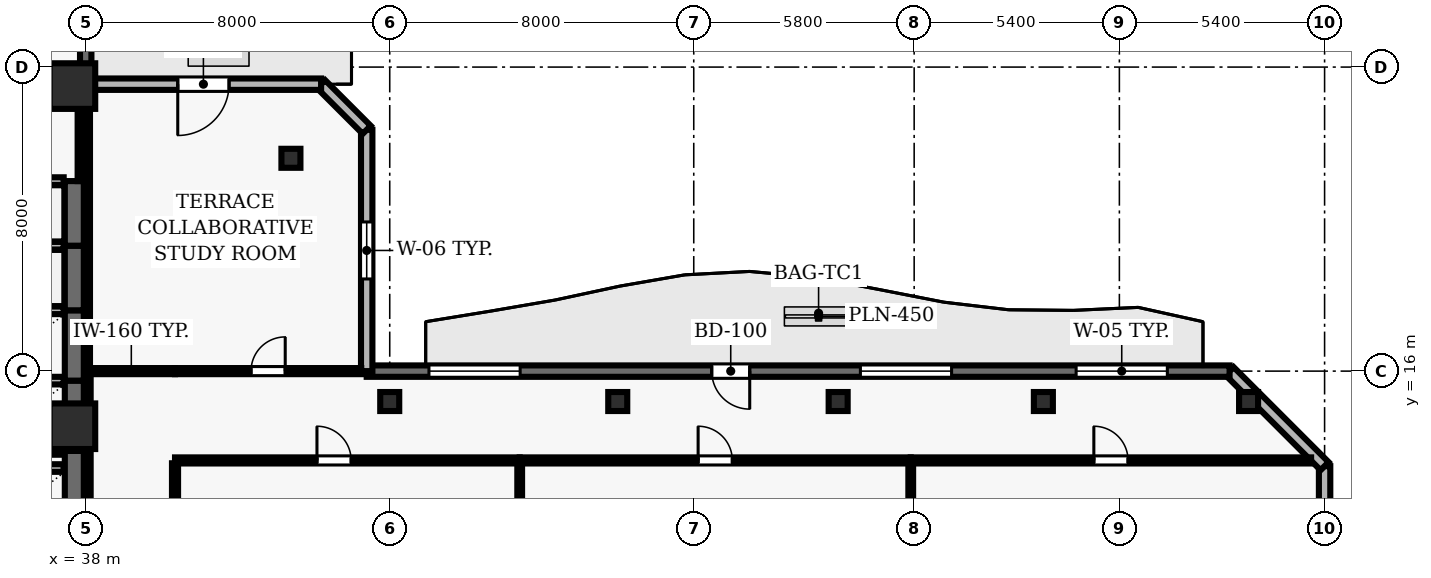
"""IFC4 building model, lengths in metres.
Left out: names, types, materials, properties, quantities, classifications, styles, units other than length and angle.
Written with IfcOpenShell. Run it as: python <this file> out.ifc"""

import sys

from ifc_helpers import new_model, si_unit, direction, frame, frame_2d, origin, origin_2d, place, context, subcontext, project, spatial, rectangle, hollow_rectangle, extrude, element, fill, save


model = new_model("IFC4")
c1 = context("Model", 3, precision=1e-05, world=origin(), true_north=direction((0.0, 1.0)))
c2 = subcontext(c1, "Body", "Model", "MODEL_VIEW")
j1 = project(units=[si_unit("LENGTHUNIT", "METRE"), si_unit("PLANEANGLEUNIT", "RADIAN")], contexts=[c1])
p1 = place(None, origin())
s1 = spatial("IfcSite", under=j1, at=p1, CompositionType="ELEMENT")
p2 = place(p1, origin())
s2 = spatial("IfcBuilding", under=s1, at=p2, CompositionType="ELEMENT")
p3 = place(p2, frame((0.0, 0.0, 150.2)))
s3 = spatial("IfcBuildingStorey", under=s2, at=p3, CompositionType="ELEMENT", Elevation=150.2)
for number, where, z_axis, x_axis in (
    (1, (37.65, 14.55, 0.0), (0.0, 0.0, 1.0), (1.0, 0.0, 0.0)),
    (2, (37.65, 23.5, 0.0), (0.0, 0.0, 1.0), (1.0, 0.0, 0.0)),
):
    element("IfcColumn", number, at=place(p3, frame(where, z_axis=z_axis, x_axis=x_axis)), inside=s3, PredefinedType="COLUMN", context=c2, shape_type="SweptSolid", body=[
        extrude(rectangle(XDim=1.2, YDim=1.2, at=origin_2d()), origin(), (0.0, 0.0, 1.0), 3.9),
    ])
for number, where, z_axis, x_axis in (
    (3, (46.0, 15.2, 0.0), (0.0, 0.0, 1.0), (1.0, 0.0, 0.0)),
    (4, (52.0, 15.2, 0.0), (0.0, 0.0, 1.0), (1.0, 0.0, 0.0)),
    (5, (57.8, 15.2, 0.0), (0.0, 0.0, 1.0), (1.0, 0.0, 0.0)),
    (6, (63.2, 15.2, 0.0), (0.0, 0.0, 1.0), (1.0, 0.0, 0.0)),
    (7, (68.6, 15.2, 0.0), (0.0, 0.0, 1.0), (1.0, 0.0, 0.0)),
    (8, (43.4, 21.6, 0.0), (0.0, 0.0, 1.0), (1.0, 0.0, 0.0)),
):
    element("IfcColumn", number, at=place(p3, frame(where, z_axis=z_axis, x_axis=x_axis)), inside=s3, PredefinedType="COLUMN", context=c2, shape_type="SweptSolid", body=[
        extrude(hollow_rectangle(XDim=0.5, YDim=0.5, WallThickness=0.025, at=origin_2d()), origin(), (0.0, 0.0, 1.0), 3.9),
    ])
p4 = place(p3, frame((70.6, 2.5, 0.0), z_axis=(0.0, 0.0, 1.0), x_axis=(0.0, 1.0, 0.0)))
e9 = element("IfcWall", 9, at=p4, inside=s3, PredefinedType="SOLIDWALL", context=c2, shape_type="SweptSolid", body=[
    extrude(rectangle(XDim=11.0, YDim=0.3, at=frame_2d((5.5, 0.0))), origin(), (0.0, 0.0, 1.0), 3.69),
])
p5 = place(p4, frame((1.85, 0.0, 0.9)))
e10 = element("IfcOpeningElement", 10, at=p5, cuts=e9, PredefinedType="OPENING", context=c2, shape_type="SweptSolid", body=[
    extrude(rectangle(XDim=1.8, YDim=1.6, at=frame_2d((0.9, 0.8))), frame((0.0, 0.16, 0.0), z_axis=(0.0, -1.0, 0.0), x_axis=(1.0, 0.0, 0.0)), (0.0, 0.0, 1.0), 0.32),
])
p6 = place(p4, frame((7.35, 0.0, 0.9)))
e11 = element("IfcOpeningElement", 11, at=p6, cuts=e9, PredefinedType="OPENING", context=c2, shape_type="SweptSolid", body=[
    extrude(rectangle(XDim=1.8, YDim=1.6, at=frame_2d((0.9, 0.8))), frame((0.0, 0.16, 0.0), z_axis=(0.0, -1.0, 0.0), x_axis=(1.0, 0.0, 0.0)), (0.0, 0.0, 1.0), 0.32),
])
p7 = place(p3, frame((70.6, 13.5, 0.0), z_axis=(0.0, 0.0, 1.0), x_axis=(-0.707106781187, 0.707106781187, 0.0)))
e12 = element("IfcWall", 12, at=p7, inside=s3, PredefinedType="SOLIDWALL", context=c2, shape_type="SweptSolid", body=[
    extrude(rectangle(XDim=3.536, YDim=0.3, at=frame_2d((1.768, 0.0))), origin(), (0.0, 0.0, 1.0), 3.69),
])
p8 = place(p3, frame((68.1, 16.0, 0.0), z_axis=(0.0, 0.0, 1.0), x_axis=(-1.0, 0.0, 0.0)))
e13 = element("IfcWall", 13, at=p8, inside=s3, PredefinedType="SOLIDWALL", context=c2, shape_type="SweptSolid", body=[
    extrude(rectangle(XDim=22.706, YDim=0.3, at=frame_2d((11.353, 0.0))), origin(), (0.0, 0.0, 1.0), 3.69),
])
p9 = place(p8, frame((12.627, 0.0, 0.0)))
e14 = element("IfcOpeningElement", 14, at=p9, cuts=e13, PredefinedType="OPENING", context=c2, shape_type="SweptSolid", body=[
    extrude(rectangle(XDim=1.0, YDim=2.2, at=frame_2d((0.5, 1.1))), frame((0.0, 0.16, 0.0), z_axis=(0.0, -1.0, 0.0), x_axis=(1.0, 0.0, 0.0)), (0.0, 0.0, 1.0), 0.32),
])
p10 = place(p8, frame((1.638, 0.0, 0.9)))
e15 = element("IfcOpeningElement", 15, at=p10, cuts=e13, PredefinedType="OPENING", context=c2, shape_type="SweptSolid", body=[
    extrude(rectangle(XDim=2.4, YDim=1.6, at=frame_2d((1.2, 0.8))), frame((0.0, 0.16, 0.0), z_axis=(0.0, -1.0, 0.0), x_axis=(1.0, 0.0, 0.0)), (0.0, 0.0, 1.0), 0.32),
])
p11 = place(p8, frame((7.315, 0.0, 0.9)))
e16 = element("IfcOpeningElement", 16, at=p11, cuts=e13, PredefinedType="OPENING", context=c2, shape_type="SweptSolid", body=[
    extrude(rectangle(XDim=2.4, YDim=1.6, at=frame_2d((1.2, 0.8))), frame((0.0, 0.16, 0.0), z_axis=(0.0, -1.0, 0.0), x_axis=(1.0, 0.0, 0.0)), (0.0, 0.0, 1.0), 0.32),
])
p12 = place(p8, frame((18.668, 0.0, 0.9)))
e17 = element("IfcOpeningElement", 17, at=p12, cuts=e13, PredefinedType="OPENING", context=c2, shape_type="SweptSolid", body=[
    extrude(rectangle(XDim=2.4, YDim=1.6, at=frame_2d((1.2, 0.8))), frame((0.0, 0.16, 0.0), z_axis=(0.0, -1.0, 0.0), x_axis=(1.0, 0.0, 0.0)), (0.0, 0.0, 1.0), 0.32),
])
p13 = place(p3, frame((45.394, 16.0, 0.0), z_axis=(0.0, 0.0, 1.0), x_axis=(0.0, 1.0, 0.0)))
e18 = element("IfcWall", 18, at=p13, inside=s3, PredefinedType="SOLIDWALL", context=c2, shape_type="SweptSolid", body=[
    extrude(rectangle(XDim=6.35, YDim=0.3, at=frame_2d((3.175, 0.0))), origin(), (0.0, 0.0, 1.0), 3.69),
])
p14 = place(p13, frame((2.425, 0.0, 0.9)))
e19 = element("IfcOpeningElement", 19, at=p14, cuts=e18, PredefinedType="OPENING", context=c2, shape_type="SweptSolid", body=[
    extrude(rectangle(XDim=1.5, YDim=1.8, at=frame_2d((0.75, 0.9))), frame((0.0, 0.16, 0.0), z_axis=(0.0, -1.0, 0.0), x_axis=(1.0, 0.0, 0.0)), (0.0, 0.0, 1.0), 0.32),
])
p15 = place(p3, frame((45.394, 22.35, 0.0), z_axis=(0.0, 0.0, 1.0), x_axis=(-0.707106781187, 0.707106781187, 0.0)))
e20 = element("IfcWall", 20, at=p15, inside=s3, PredefinedType="SOLIDWALL", context=c2, shape_type="SweptSolid", body=[
    extrude(rectangle(XDim=1.697, YDim=0.3, at=frame_2d((0.849, 0.0))), origin(), (0.0, 0.0, 1.0), 3.69),
])
p16 = place(p3, frame((44.194, 23.55, 0.0), z_axis=(0.0, 0.0, 1.0), x_axis=(-1.0, 0.0, 0.0)))
e21 = element("IfcWall", 21, at=p16, inside=s3, PredefinedType="SOLIDWALL", context=c2, shape_type="SweptSolid", body=[
    extrude(rectangle(XDim=6.194, YDim=0.3, at=frame_2d((3.097, 0.0))), origin(), (0.0, 0.0, 1.0), 3.69),
])
p17 = place(p16, frame((2.422, 0.0, 0.0)))
e22 = element("IfcOpeningElement", 22, at=p17, cuts=e21, PredefinedType="OPENING", context=c2, shape_type="SweptSolid", body=[
    extrude(rectangle(XDim=1.35, YDim=2.2, at=frame_2d((0.675, 1.1))), frame((0.0, 0.16, 0.0), z_axis=(0.0, -1.0, 0.0), x_axis=(1.0, 0.0, 0.0)), (0.0, 0.0, 1.0), 0.32),
])
p18 = place(p3, frame((38.0, 23.55, 0.0), z_axis=(0.0, 0.0, 1.0), x_axis=(0.0, 1.0, 0.0)))
e23 = element("IfcWall", 23, at=p18, inside=s3, PredefinedType="SOLIDWALL", context=c2, shape_type="SweptSolid", body=[
    extrude(rectangle(XDim=22.55, YDim=0.3, at=frame_2d((11.275, 0.0))), origin(), (0.0, 0.0, 1.0), 3.69),
])
p19 = place(p18, frame((13.8, 0.0, 0.0)))
e24 = element("IfcOpeningElement", 24, at=p19, cuts=e23, PredefinedType="OPENING", context=c2, shape_type="SweptSolid", body=[
    extrude(rectangle(XDim=1.0, YDim=2.2, at=frame_2d((0.5, 1.1))), frame((0.0, 0.16, 0.0), z_axis=(0.0, -1.0, 0.0), x_axis=(1.0, 0.0, 0.0)), (0.0, 0.0, 1.0), 0.32),
])
p20 = place(p18, frame((7.056, 0.0, 0.9)))
e25 = element("IfcOpeningElement", 25, at=p20, cuts=e23, PredefinedType="OPENING", context=c2, shape_type="SweptSolid", body=[
    extrude(rectangle(XDim=2.8, YDim=1.8, at=frame_2d((1.4, 0.9))), frame((0.0, 0.16, 0.0), z_axis=(0.0, -1.0, 0.0), x_axis=(1.0, 0.0, 0.0)), (0.0, 0.0, 1.0), 0.32),
])
p21 = place(p18, frame((18.331, 0.0, 0.9)))
e26 = element("IfcOpeningElement", 26, at=p21, cuts=e23, PredefinedType="OPENING", context=c2, shape_type="SweptSolid", body=[
    extrude(rectangle(XDim=2.8, YDim=1.8, at=frame_2d((1.4, 0.9))), frame((0.0, 0.16, 0.0), z_axis=(0.0, -1.0, 0.0), x_axis=(1.0, 0.0, 0.0)), (0.0, 0.0, 1.0), 0.32),
])
p22 = place(p3, frame((37.7, 11.55, 0.0), z_axis=(0.0, 0.0, 1.0), x_axis=(0.0, 1.0, 0.0)))
e27 = element("IfcWall", 27, at=p22, inside=s3, PredefinedType="SHEAR", context=c2, shape_type="SweptSolid", body=[
    extrude(rectangle(XDim=2.35, YDim=0.5, at=frame_2d((1.175, 0.0))), origin(), (0.0, 0.0, 1.0), 3.69),
])
p23 = place(p3, frame((37.42, 13.45, 0.0), z_axis=(0.0, 0.0, 1.0), x_axis=(-1.0, 0.0, 0.0)))
e28 = element("IfcWall", 28, at=p23, inside=s3, PredefinedType="SOLIDWALL", context=c2, shape_type="SweptSolid", body=[
    extrude(rectangle(XDim=2.14, YDim=0.2, at=frame_2d((1.07, 0.0))), origin(), (0.0, 0.0, 1.0), 3.69),
])
p24 = place(p3, frame((37.7, 13.9, 0.0), z_axis=(0.0, 0.0, 1.0), x_axis=(0.0, 1.0, 0.0)))
e29 = element("IfcWall", 29, at=p24, inside=s3, PredefinedType="SHEAR", context=c2, shape_type="SweptSolid", body=[
    extrude(rectangle(XDim=1.85, YDim=0.5, at=frame_2d((0.925, 0.0))), origin(), (0.0, 0.0, 1.0), 3.69),
])
for number, where, z_axis, x_axis in (
    (30, (35.28, 13.9, 0.0), (0.0, 0.0, 1.0), (1.0, 0.0, 0.0)),
    (31, (37.42, 15.75, 0.0), (0.0, 0.0, 1.0), (-1.0, 0.0, 0.0)),
):
    element("IfcWall", number, at=place(p3, frame(where, z_axis=z_axis, x_axis=x_axis)), inside=s3, PredefinedType="SOLIDWALL", context=c2, shape_type="SweptSolid", body=[
        extrude(rectangle(XDim=2.14, YDim=0.2, at=frame_2d((1.07, 0.0))), origin(), (0.0, 0.0, 1.0), 3.69),
    ])
p25 = place(p3, frame((37.7, 15.75, 0.0), z_axis=(0.0, 0.0, 1.0), x_axis=(0.0, 1.0, 0.0)))
e32 = element("IfcWall", 32, at=p25, inside=s3, PredefinedType="SHEAR", context=c2, shape_type="SweptSolid", body=[
    extrude(rectangle(XDim=1.85, YDim=0.5, at=frame_2d((0.925, 0.0))), origin(), (0.0, 0.0, 1.0), 3.69),
])
p26 = place(p3, frame((37.42, 17.6, 0.0), z_axis=(0.0, 0.0, 1.0), x_axis=(-1.0, 0.0, 0.0)))
e33 = element("IfcWall", 33, at=p26, inside=s3, PredefinedType="SOLIDWALL", context=c2, shape_type="SweptSolid", body=[
    extrude(rectangle(XDim=2.14, YDim=0.2, at=frame_2d((1.07, 0.0))), origin(), (0.0, 0.0, 1.0), 3.69),
])
p27 = place(p3, frame((37.7, 17.6, 0.0), z_axis=(0.0, 0.0, 1.0), x_axis=(0.0, 1.0, 0.0)))
e34 = element("IfcWall", 34, at=p27, inside=s3, PredefinedType="SHEAR", context=c2, shape_type="SweptSolid", body=[
    extrude(rectangle(XDim=1.7, YDim=0.5, at=frame_2d((0.85, 0.0))), origin(), (0.0, 0.0, 1.0), 3.69),
])
p28 = place(p3, frame((37.42, 19.3, 0.0), z_axis=(0.0, 0.0, 1.0), x_axis=(-1.0, 0.0, 0.0)))
e35 = element("IfcWall", 35, at=p28, inside=s3, PredefinedType="SOLIDWALL", context=c2, shape_type="SweptSolid", body=[
    extrude(rectangle(XDim=2.14, YDim=0.2, at=frame_2d((1.07, 0.0))), origin(), (0.0, 0.0, 1.0), 3.69),
])
p29 = place(p3, frame((37.7, 19.3, 0.0), z_axis=(0.0, 0.0, 1.0), x_axis=(0.0, 1.0, 0.0)))
e36 = element("IfcWall", 36, at=p29, inside=s3, PredefinedType="SHEAR", context=c2, shape_type="SweptSolid", body=[
    extrude(rectangle(XDim=1.7, YDim=0.5, at=frame_2d((0.85, 0.0))), origin(), (0.0, 0.0, 1.0), 3.69),
])
p30 = place(p3, frame((37.42, 21.0, 0.0), z_axis=(0.0, 0.0, 1.0), x_axis=(-1.0, 0.0, 0.0)))
e37 = element("IfcWall", 37, at=p30, inside=s3, PredefinedType="SOLIDWALL", context=c2, shape_type="SweptSolid", body=[
    extrude(rectangle(XDim=2.14, YDim=0.2, at=frame_2d((1.07, 0.0))), origin(), (0.0, 0.0, 1.0), 3.69),
])
p31 = place(p3, frame((37.85, 23.85, 0.0), z_axis=(0.0, 0.0, 1.0), x_axis=(-1.0, 0.0, 0.0)))
e38 = element("IfcWall", 38, at=p31, inside=s3, PredefinedType="PARTITIONING", context=c2, shape_type="SweptSolid", body=[
    extrude(rectangle(XDim=4.0, YDim=0.16, at=frame_2d((2.0, 0.0))), origin(), (0.0, 0.0, 1.0), 3.074),
])
p32 = place(p31, frame((2.25, 0.0, 0.0)))
e39 = element("IfcOpeningElement", 39, at=p32, cuts=e38, PredefinedType="OPENING", context=c2, shape_type="SweptSolid", body=[
    extrude(rectangle(XDim=0.9, YDim=2.1, at=frame_2d((0.45, 1.05))), frame((0.0, 0.09, 0.0), z_axis=(0.0, -1.0, 0.0), x_axis=(1.0, 0.0, 0.0)), (0.0, 0.0, 1.0), 0.18),
])
p33 = place(p3, frame((40.35, 13.65, 0.0), z_axis=(0.0, 0.0, 1.0), x_axis=(1.0, 0.0, 0.0)))
e40 = element("IfcWall", 40, at=p33, inside=s3, PredefinedType="PARTITIONING", context=c2, shape_type="SweptSolid", body=[
    extrude(rectangle(XDim=9.07, YDim=0.16, at=frame_2d((4.535, 0.0))), origin(), (0.0, 0.0, 1.0), 3.69),
])
p34 = place(p33, frame((3.735, 0.0, 0.0)))
e41 = element("IfcOpeningElement", 41, at=p34, cuts=e40, PredefinedType="OPENING", context=c2, shape_type="SweptSolid", body=[
    extrude(rectangle(XDim=0.9, YDim=2.1, at=frame_2d((0.45, 1.05))), frame((0.0, 0.09, 0.0), z_axis=(0.0, -1.0, 0.0), x_axis=(1.0, 0.0, 0.0)), (0.0, 0.0, 1.0), 0.18),
])
p35 = place(p3, frame((40.35, 16.0, 0.0), z_axis=(0.0, 0.0, 1.0), x_axis=(-1.0, 0.0, 0.0)))
e42 = element("IfcWall", 42, at=p35, inside=s3, PredefinedType="PARTITIONING", context=c2, shape_type="SweptSolid", body=[
    extrude(rectangle(XDim=2.3, YDim=0.16, at=frame_2d((1.15, 0.0))), origin(), (0.0, 0.0, 1.0), 3.69),
])
p36 = place(p3, frame((40.35, 16.0, 0.0), z_axis=(0.0, 0.0, 1.0), x_axis=(1.0, 0.0, 0.0)))
e43 = element("IfcWall", 43, at=p36, inside=s3, PredefinedType="PARTITIONING", context=c2, shape_type="SweptSolid", body=[
    extrude(rectangle(XDim=4.899, YDim=0.16, at=frame_2d((2.449, 0.0))), origin(), (0.0, 0.0, 1.0), 3.69),
])
p37 = place(p36, frame((2.0, 0.0, 0.0)))
e44 = element("IfcOpeningElement", 44, at=p37, cuts=e43, PredefinedType="OPENING", context=c2, shape_type="SweptSolid", body=[
    extrude(rectangle(XDim=0.9, YDim=2.1, at=frame_2d((0.45, 1.05))), frame((0.0, 0.09, 0.0), z_axis=(0.0, -1.0, 0.0), x_axis=(1.0, 0.0, 0.0)), (0.0, 0.0, 1.0), 0.18),
])
p38 = place(p3, frame((49.42, 13.65, 0.0), z_axis=(0.0, 0.0, 1.0), x_axis=(1.0, 0.0, 0.0)))
e45 = element("IfcWall", 45, at=p38, inside=s3, PredefinedType="PARTITIONING", context=c2, shape_type="SweptSolid", body=[
    extrude(rectangle(XDim=10.29, YDim=0.16, at=frame_2d((5.145, 0.0))), origin(), (0.0, 0.0, 1.0), 3.69),
])
p39 = place(p38, frame((4.695, 0.0, 0.0)))
e46 = element("IfcOpeningElement", 46, at=p39, cuts=e45, PredefinedType="OPENING", context=c2, shape_type="SweptSolid", body=[
    extrude(rectangle(XDim=0.9, YDim=2.1, at=frame_2d((0.45, 1.05))), frame((0.0, 0.09, 0.0), z_axis=(0.0, -1.0, 0.0), x_axis=(1.0, 0.0, 0.0)), (0.0, 0.0, 1.0), 0.18),
])
p40 = place(p3, frame((59.71, 13.65, 0.0), z_axis=(0.0, 0.0, 1.0), x_axis=(1.0, 0.0, 0.0)))
e47 = element("IfcWall", 47, at=p40, inside=s3, PredefinedType="PARTITIONING", context=c2, shape_type="SweptSolid", body=[
    extrude(rectangle(XDim=10.535, YDim=0.16, at=frame_2d((5.268, 0.0))), origin(), (0.0, 0.0, 1.0), 3.69),
])
p41 = place(p40, frame((4.818, 0.0, 0.0)))
e48 = element("IfcOpeningElement", 48, at=p41, cuts=e47, PredefinedType="OPENING", context=c2, shape_type="SweptSolid", body=[
    extrude(rectangle(XDim=0.9, YDim=2.1, at=frame_2d((0.45, 1.05))), frame((0.0, 0.09, 0.0), z_axis=(0.0, -1.0, 0.0), x_axis=(1.0, 0.0, 0.0)), (0.0, 0.0, 1.0), 0.18),
])
p42 = place(p3, frame((37.85, 21.0, 0.0), z_axis=(0.0, 0.0, 1.0), x_axis=(0.0, 1.0, 0.0)))
e49 = element("IfcWall", 49, at=p42, inside=s3, PredefinedType="PARTITIONING", context=c2, shape_type="SweptSolid", body=[
    extrude(rectangle(XDim=2.55, YDim=0.125, at=frame_2d((1.275, 0.0))), origin(), (0.0, 0.0, 1.0), 3.074),
])
p43 = place(p3, frame((38.05, 15.925, 0.0), z_axis=(0.0, 0.0, 1.0), x_axis=(0.0, -1.0, 0.0)))
e50 = element("IfcWall", 50, at=p43, inside=s3, PredefinedType="PARTITIONING", context=c2, shape_type="SweptSolid", body=[
    extrude(rectangle(XDim=6.375, YDim=0.16, at=frame_2d((3.188, 0.0))), origin(), (0.0, 0.0, 1.0), 3.074),
])
p44 = place(p3, frame((38.05, 23.405, 0.0), z_axis=(0.0, 0.0, 1.0), x_axis=(0.0, -1.0, 0.0)))
e51 = element("IfcWall", 51, at=p44, inside=s3, PredefinedType="PARTITIONING", context=c2, shape_type="SweptSolid", body=[
    extrude(rectangle(XDim=7.33, YDim=0.125, at=frame_2d((3.665, 0.0))), origin(), (0.0, 0.0, 1.0), 3.074),
])
p45 = place(p3, frame((40.35, 8.008, 0.0), z_axis=(0.0, 0.0, 1.0), x_axis=(0.0, 1.0, 0.0)))
e52 = element("IfcWall", 52, at=p45, inside=s3, PredefinedType="PARTITIONING", context=c2, shape_type="SweptSolid", body=[
    extrude(rectangle(XDim=5.567, YDim=0.16, at=frame_2d((2.783, 0.0))), origin(), (0.0, 0.0, 1.0), 3.69),
])
for number, where, z_axis, x_axis in (
    (53, (49.42, 8.008, 0.0), (0.0, 0.0, 1.0), (0.0, 1.0, 0.0)),
    (54, (59.71, 8.008, 0.0), (0.0, 0.0, 1.0), (0.0, 1.0, 0.0)),
):
    element("IfcWall", number, at=place(p3, frame(where, z_axis=z_axis, x_axis=x_axis)), inside=s3, PredefinedType="PARTITIONING", context=c2, shape_type="SweptSolid", body=[
        extrude(rectangle(XDim=5.567, YDim=0.125, at=frame_2d((2.783, 0.0))), origin(), (0.0, 0.0, 1.0), 3.69),
    ])
p46 = place(p9, origin())
e55 = element("IfcDoor", 55, at=p46, inside=s3, OperationType="SINGLE_SWING_LEFT", PredefinedType="DOOR", context=c2, shape_type="SweptSolid", body=[
    extrude(rectangle(XDim=1.0, YDim=2.2, at=frame_2d((0.5, 1.1))), frame((0.0, 0.025, 0.0), z_axis=(0.0, -1.0, 0.0), x_axis=(1.0, 0.0, 0.0)), (0.0, 0.0, 1.0), 0.05),
])
fill(e14, e55)
p47 = place(p10, origin())
e56 = element("IfcWindow", 56, at=p47, inside=s3, PartitioningType="SINGLE_PANEL", PredefinedType="WINDOW", context=c2, shape_type="SweptSolid", body=[
    extrude(rectangle(XDim=2.4, YDim=1.6, at=frame_2d((1.2, 0.8))), frame((0.0, 0.03, 0.0), z_axis=(0.0, -1.0, 0.0), x_axis=(1.0, 0.0, 0.0)), (0.0, 0.0, 1.0), 0.06),
])
fill(e15, e56)
p48 = place(p11, origin())
e57 = element("IfcWindow", 57, at=p48, inside=s3, PartitioningType="SINGLE_PANEL", PredefinedType="WINDOW", context=c2, shape_type="SweptSolid", body=[
    extrude(rectangle(XDim=2.4, YDim=1.6, at=frame_2d((1.2, 0.8))), frame((0.0, 0.03, 0.0), z_axis=(0.0, -1.0, 0.0), x_axis=(1.0, 0.0, 0.0)), (0.0, 0.0, 1.0), 0.06),
])
fill(e16, e57)
p49 = place(p12, origin())
e58 = element("IfcWindow", 58, at=p49, inside=s3, PartitioningType="SINGLE_PANEL", PredefinedType="WINDOW", context=c2, shape_type="SweptSolid", body=[
    extrude(rectangle(XDim=2.4, YDim=1.6, at=frame_2d((1.2, 0.8))), frame((0.0, 0.03, 0.0), z_axis=(0.0, -1.0, 0.0), x_axis=(1.0, 0.0, 0.0)), (0.0, 0.0, 1.0), 0.06),
])
fill(e17, e58)
p50 = place(p14, origin())
e59 = element("IfcWindow", 59, at=p50, inside=s3, PartitioningType="SINGLE_PANEL", PredefinedType="WINDOW", context=c2, shape_type="SweptSolid", body=[
    extrude(rectangle(XDim=1.5, YDim=1.8, at=frame_2d((0.75, 0.9))), frame((0.0, 0.03, 0.0), z_axis=(0.0, -1.0, 0.0), x_axis=(1.0, 0.0, 0.0)), (0.0, 0.0, 1.0), 0.06),
])
fill(e19, e59)
p51 = place(p17, origin())
e60 = element("IfcDoor", 60, at=p51, inside=s3, OperationType="SINGLE_SWING_RIGHT", PredefinedType="DOOR", context=c2, shape_type="SweptSolid", body=[
    extrude(rectangle(XDim=1.35, YDim=2.2, at=frame_2d((0.675, 1.1))), frame((0.0, 0.025, 0.0), z_axis=(0.0, -1.0, 0.0), x_axis=(1.0, 0.0, 0.0)), (0.0, 0.0, 1.0), 0.05),
])
fill(e22, e60)
p52 = place(p34, origin())
e61 = element("IfcDoor", 61, at=p52, inside=s3, OperationType="SINGLE_SWING_LEFT", PredefinedType="DOOR", context=c2, shape_type="SweptSolid", body=[
    extrude(rectangle(XDim=0.9, YDim=2.1, at=frame_2d((0.45, 1.05))), frame((0.0, 0.025, 0.0), z_axis=(0.0, -1.0, 0.0), x_axis=(1.0, 0.0, 0.0)), (0.0, 0.0, 1.0), 0.05),
])
fill(e41, e61)
p53 = place(p39, origin())
e62 = element("IfcDoor", 62, at=p53, inside=s3, OperationType="SINGLE_SWING_LEFT", PredefinedType="DOOR", context=c2, shape_type="SweptSolid", body=[
    extrude(rectangle(XDim=0.9, YDim=2.1, at=frame_2d((0.45, 1.05))), frame((0.0, 0.025, 0.0), z_axis=(0.0, -1.0, 0.0), x_axis=(1.0, 0.0, 0.0)), (0.0, 0.0, 1.0), 0.05),
])
fill(e46, e62)
p54 = place(p41, origin())
e63 = element("IfcDoor", 63, at=p54, inside=s3, OperationType="SINGLE_SWING_LEFT", PredefinedType="DOOR", context=c2, shape_type="SweptSolid", body=[
    extrude(rectangle(XDim=0.9, YDim=2.1, at=frame_2d((0.45, 1.05))), frame((0.0, 0.025, 0.0), z_axis=(0.0, -1.0, 0.0), x_axis=(1.0, 0.0, 0.0)), (0.0, 0.0, 1.0), 0.05),
])
fill(e48, e63)
p55 = place(p37, origin())
e64 = element("IfcDoor", 64, at=p55, inside=s3, OperationType="SINGLE_SWING_RIGHT", PredefinedType="DOOR", context=c2, shape_type="SweptSolid", body=[
    extrude(rectangle(XDim=0.9, YDim=2.1, at=frame_2d((0.45, 1.05))), frame((0.0, 0.025, 0.0), z_axis=(0.0, -1.0, 0.0), x_axis=(1.0, 0.0, 0.0)), (0.0, 0.0, 1.0), 0.05),
])
fill(e44, e64)
save(model, sys.argv[1])
